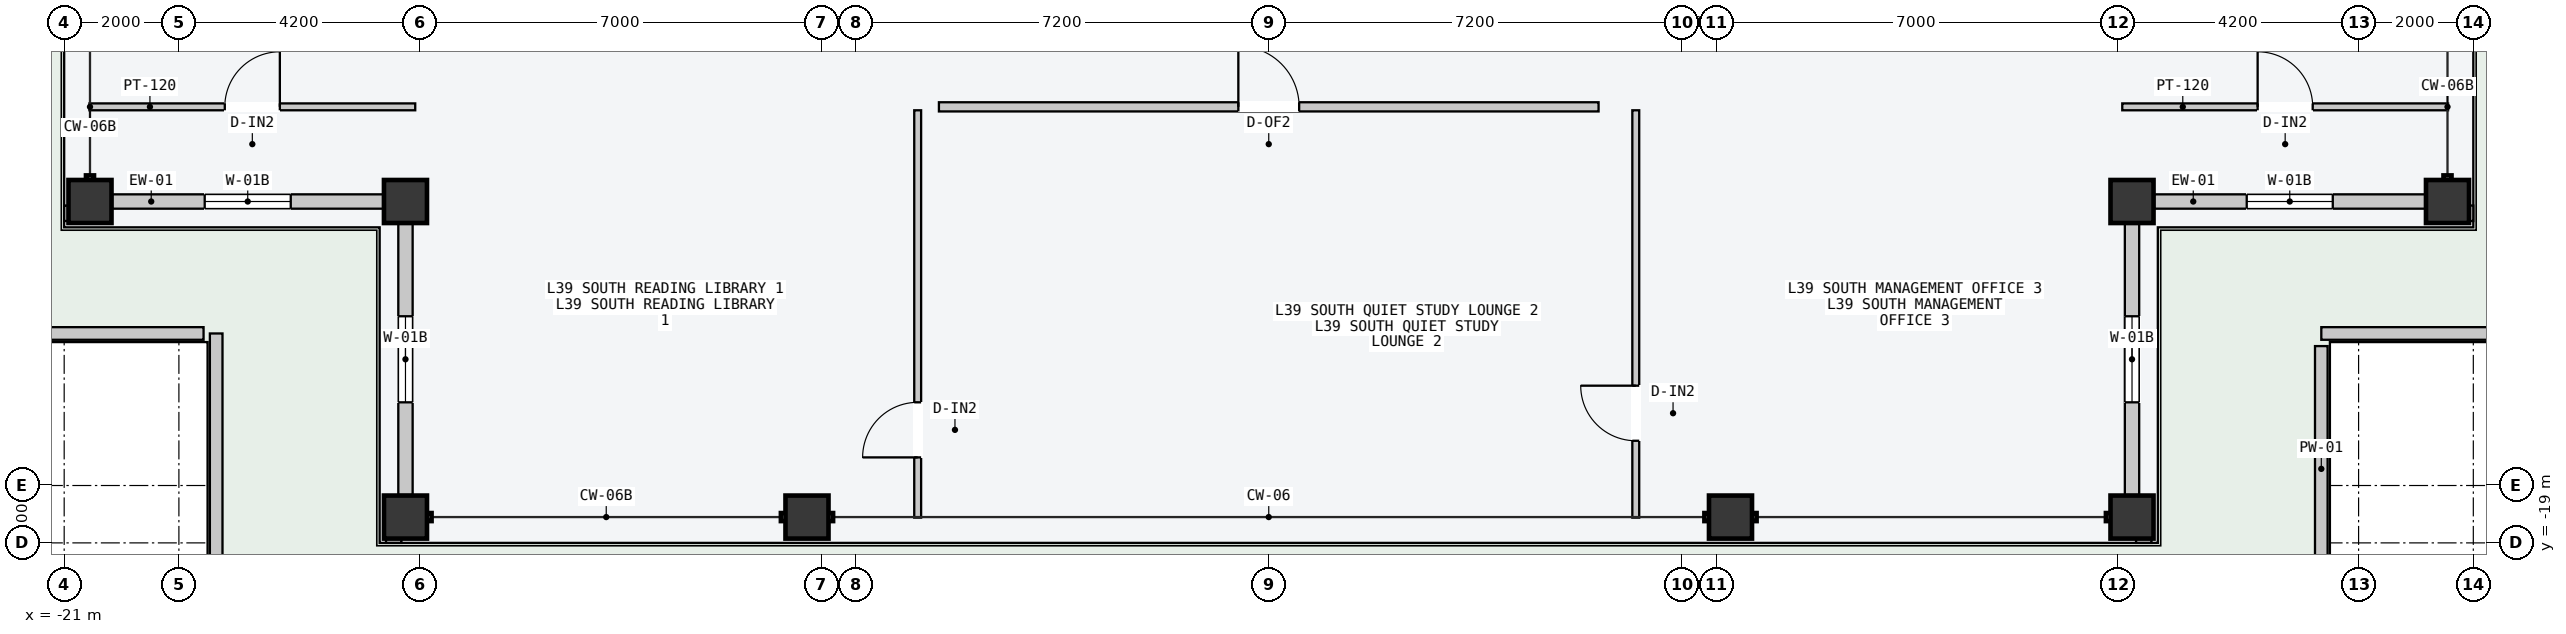
"""IFC4 building model, lengths in metres.
Left out: names, types, materials, properties, quantities, classifications, styles, units other than length and angle.
Written with IfcOpenShell. Run it as: python <this file> out.ifc"""

import sys

from ifc_helpers import new_model, si_unit, direction, frame, frame_2d, origin, origin_2d, place, context, subcontext, project, spatial, rectangle, hollow_rectangle, extrude, element, fill, save


model = new_model("IFC4")
c1 = context("Model", 3, precision=1e-05, world=origin(), true_north=direction((0.0, 1.0)))
c2 = subcontext(c1, "Body", "Model", "MODEL_VIEW")
j1 = project(units=[si_unit("LENGTHUNIT", "METRE"), si_unit("PLANEANGLEUNIT", "RADIAN")], contexts=[c1])
p1 = place(None, origin())
s1 = spatial("IfcSite", under=j1, at=p1, CompositionType="ELEMENT")
p2 = place(p1, origin())
s2 = spatial("IfcBuilding", under=s1, at=p2, CompositionType="ELEMENT")
p3 = place(p2, frame((0.0, 0.0, 150.6)))
s3 = spatial("IfcBuildingStorey", under=s2, at=p3, CompositionType="ELEMENT", Elevation=150.6)
for number, where, z_axis, x_axis in (
    (1, (-15.05, -18.55, -0.2), (0.0, 0.0, 1.0), (1.0, 0.0, 0.0)),
    (2, (-8.05, -18.55, -0.2), (0.0, 0.0, 1.0), (1.0, 0.0, 0.0)),
    (3, (8.05, -18.55, -0.2), (0.0, 0.0, 1.0), (1.0, 0.0, 0.0)),
    (4, (15.05, -18.55, -0.2), (0.0, 0.0, 1.0), (1.0, 0.0, 0.0)),
    (5, (-20.55, -13.05, -0.2), (0.0, 0.0, 1.0), (0.0, 1.0, 0.0)),
    (6, (20.55, -13.05, -0.2), (0.0, 0.0, 1.0), (0.0, 1.0, 0.0)),
    (7, (15.05, -13.05, -0.2), (0.0, 0.0, 1.0), (1.0, 0.0, 0.0)),
    (8, (-15.05, -13.05, -0.2), (0.0, 0.0, 1.0), (1.0, 0.0, 0.0)),
):
    element("IfcColumn", number, at=place(p3, frame(where, z_axis=z_axis, x_axis=x_axis)), inside=s3, PredefinedType="COLUMN", context=c2, shape_type="SweptSolid", body=[
        extrude(hollow_rectangle(XDim=0.75, YDim=0.75, WallThickness=0.032, at=origin_2d()), origin(), (0.0, 0.0, 1.0), 4.7),
    ])
p4 = place(p3, frame((-20.165, -13.05, 0.0), z_axis=(0.0, 0.0, 1.0), x_axis=(1.0, 0.0, 0.0)))
e9 = element("IfcWall", 9, at=p4, inside=s3, PredefinedType="STANDARD", context=c2, shape_type="SweptSolid", body=[
    extrude(rectangle(XDim=4.73, YDim=0.25, at=frame_2d((2.365, 0.0))), origin(), (0.0, 0.0, 1.0), 3.65),
])
p5 = place(p4, frame((1.615, 0.0, 0.85)))
e10 = element("IfcOpeningElement", 10, at=p5, cuts=e9, PredefinedType="OPENING", context=c2, shape_type="SweptSolid", body=[
    extrude(rectangle(XDim=1.5, YDim=1.95, at=frame_2d((0.75, 0.975))), frame((0.0, 0.135, 0.0), z_axis=(0.0, -1.0, 0.0), x_axis=(1.0, 0.0, 0.0)), (0.0, 0.0, 1.0), 0.27),
])
p6 = place(p3, frame((-15.05, -18.165, 0.0), z_axis=(0.0, 0.0, 1.0), x_axis=(0.0, 1.0, 0.0)))
e11 = element("IfcWall", 11, at=p6, inside=s3, PredefinedType="STANDARD", context=c2, shape_type="SweptSolid", body=[
    extrude(rectangle(XDim=4.73, YDim=0.25, at=frame_2d((2.365, 0.0))), origin(), (0.0, 0.0, 1.0), 3.65),
])
p7 = place(p6, frame((1.615, 0.0, 0.85)))
e12 = element("IfcOpeningElement", 12, at=p7, cuts=e11, PredefinedType="OPENING", context=c2, shape_type="SweptSolid", body=[
    extrude(rectangle(XDim=1.5, YDim=1.95, at=frame_2d((0.75, 0.975))), frame((0.0, 0.135, 0.0), z_axis=(0.0, -1.0, 0.0), x_axis=(1.0, 0.0, 0.0)), (0.0, 0.0, 1.0), 0.27),
])
p8 = place(p3, frame((15.435, -13.05, 0.0), z_axis=(0.0, 0.0, 1.0), x_axis=(1.0, 0.0, 0.0)))
e13 = element("IfcWall", 13, at=p8, inside=s3, PredefinedType="STANDARD", context=c2, shape_type="SweptSolid", body=[
    extrude(rectangle(XDim=4.73, YDim=0.25, at=frame_2d((2.365, 0.0))), origin(), (0.0, 0.0, 1.0), 3.65),
])
p9 = place(p8, frame((1.615, 0.0, 0.85)))
e14 = element("IfcOpeningElement", 14, at=p9, cuts=e13, PredefinedType="OPENING", context=c2, shape_type="SweptSolid", body=[
    extrude(rectangle(XDim=1.5, YDim=1.95, at=frame_2d((0.75, 0.975))), frame((0.0, 0.135, 0.0), z_axis=(0.0, -1.0, 0.0), x_axis=(1.0, 0.0, 0.0)), (0.0, 0.0, 1.0), 0.27),
])
p10 = place(p3, frame((15.05, -18.165, 0.0), z_axis=(0.0, 0.0, 1.0), x_axis=(0.0, 1.0, 0.0)))
e15 = element("IfcWall", 15, at=p10, inside=s3, PredefinedType="STANDARD", context=c2, shape_type="SweptSolid", body=[
    extrude(rectangle(XDim=4.73, YDim=0.25, at=frame_2d((2.365, 0.0))), origin(), (0.0, 0.0, 1.0), 3.65),
])
p11 = place(p10, frame((1.615, 0.0, 0.85)))
e16 = element("IfcOpeningElement", 16, at=p11, cuts=e15, PredefinedType="OPENING", context=c2, shape_type="SweptSolid", body=[
    extrude(rectangle(XDim=1.5, YDim=1.95, at=frame_2d((0.75, 0.975))), frame((0.0, 0.135, 0.0), z_axis=(0.0, -1.0, 0.0), x_axis=(1.0, 0.0, 0.0)), (0.0, 0.0, 1.0), 0.27),
])
for number, where, z_axis, x_axis in (
    (17, (-15.39, -18.89, 0.0), (0.0, 0.0, 1.0), (1.0, 0.0, 0.0)),
    (18, (-20.89, -13.39, 0.0), (0.0, 0.0, 1.0), (0.0, 1.0, 0.0)),
    (19, (15.12, -18.89, 0.0), (0.0, 0.0, 1.0), (1.0, 0.0, 0.0)),
    (20, (20.89, -13.39, 0.0), (0.0, 0.0, 1.0), (0.0, 1.0, 0.0)),
):
    element("IfcWall", number, at=place(p3, frame(where, z_axis=z_axis, x_axis=x_axis)), inside=s3, PredefinedType="PARAPET", context=c2, shape_type="SweptSolid", body=[
        extrude(rectangle(XDim=0.27, YDim=0.22, at=frame_2d((0.135, 0.0))), origin(), (0.0, 0.0, 1.0), 1.2),
    ])
p12 = place(p3, frame((18.35, -19.85, 0.0), z_axis=(0.0, 0.0, 1.0), x_axis=(0.0, 1.0, 0.0)))
e21 = element("IfcWall", 21, at=p12, inside=s3, PredefinedType="PARAPET", context=c2, shape_type="SweptSolid", body=[
    extrude(rectangle(XDim=4.28, YDim=0.22, at=frame_2d((2.14, 0.0))), origin(), (0.0, 0.0, 1.0), 1.2),
])
p13 = place(p3, frame((18.35, -15.35, 0.0), z_axis=(0.0, 0.0, 1.0), x_axis=(1.0, 0.0, 0.0)))
e22 = element("IfcWall", 22, at=p13, inside=s3, PredefinedType="PARAPET", context=c2, shape_type="SweptSolid", body=[
    extrude(rectangle(XDim=4.28, YDim=0.22, at=frame_2d((2.14, 0.0))), origin(), (0.0, 0.0, 1.0), 1.2),
])
p14 = place(p3, frame((-22.85, -15.35, 0.0), z_axis=(0.0, 0.0, 1.0), x_axis=(1.0, 0.0, 0.0)))
e23 = element("IfcWall", 23, at=p14, inside=s3, PredefinedType="PARAPET", context=c2, shape_type="SweptSolid", body=[
    extrude(rectangle(XDim=4.28, YDim=0.22, at=frame_2d((2.14, 0.0))), origin(), (0.0, 0.0, 1.0), 1.2),
])
p15 = place(p3, frame((-18.35, -15.35, 0.0), z_axis=(0.0, 0.0, 1.0), x_axis=(0.0, -1.0, 0.0)))
e24 = element("IfcWall", 24, at=p15, inside=s3, PredefinedType="PARAPET", context=c2, shape_type="SweptSolid", body=[
    extrude(rectangle(XDim=4.28, YDim=0.22, at=frame_2d((2.14, 0.0))), origin(), (0.0, 0.0, 1.0), 1.2),
])
p16 = place(p3, frame((-6.12, -18.56, 0.0), z_axis=(0.0, 0.0, 1.0), x_axis=(0.0, 1.0, 0.0)))
e25 = element("IfcWall", 25, at=p16, inside=s3, PredefinedType="PARTITIONING", context=c2, shape_type="SweptSolid", body=[
    extrude(rectangle(XDim=7.1, YDim=0.12, at=frame_2d((3.55, 0.0))), origin(), (0.0, 0.0, 1.0), 4.3),
])
p17 = place(p16, frame((1.05, 0.0, 0.0)))
e26 = element("IfcOpeningElement", 26, at=p17, cuts=e25, PredefinedType="OPENING", context=c2, shape_type="SweptSolid", body=[
    extrude(rectangle(XDim=0.96, YDim=2.18, at=frame_2d((0.48, 1.09))), frame((0.0, 0.07, 0.0), z_axis=(0.0, -1.0, 0.0), x_axis=(1.0, 0.0, 0.0)), (0.0, 0.0, 1.0), 0.14),
])
p18 = place(p3, frame((6.399, -18.56, 0.0), z_axis=(0.0, 0.0, 1.0), x_axis=(0.0, 1.0, 0.0)))
e27 = element("IfcWall", 27, at=p18, inside=s3, PredefinedType="PARTITIONING", context=c2, shape_type="SweptSolid", body=[
    extrude(rectangle(XDim=7.1, YDim=0.12, at=frame_2d((3.55, 0.0))), origin(), (0.0, 0.0, 1.0), 4.3),
])
p19 = place(p18, frame((1.34, 0.0, 0.0)))
e28 = element("IfcOpeningElement", 28, at=p19, cuts=e27, PredefinedType="OPENING", context=c2, shape_type="SweptSolid", body=[
    extrude(rectangle(XDim=0.96, YDim=2.18, at=frame_2d((0.48, 1.09))), frame((0.0, 0.07, 0.0), z_axis=(0.0, -1.0, 0.0), x_axis=(1.0, 0.0, 0.0)), (0.0, 0.0, 1.0), 0.14),
])
p20 = place(p3, frame((-5.75, -11.4, 0.0), z_axis=(0.0, 0.0, 1.0), x_axis=(1.0, 0.0, 0.0)))
e29 = element("IfcWall", 29, at=p20, inside=s3, PredefinedType="PARTITIONING", context=c2, shape_type="SweptSolid", body=[
    extrude(rectangle(XDim=11.5, YDim=0.16, at=frame_2d((5.75, 0.0))), origin(), (0.0, 0.0, 1.0), 4.3),
])
p21 = place(p20, frame((5.22, 0.0, 0.0)))
e30 = element("IfcOpeningElement", 30, at=p21, cuts=e29, PredefinedType="OPENING", context=c2, shape_type="SweptSolid", body=[
    extrude(rectangle(XDim=1.06, YDim=2.2, at=frame_2d((0.53, 1.1))), frame((0.0, 0.09, 0.0), z_axis=(0.0, -1.0, 0.0), x_axis=(1.0, 0.0, 0.0)), (0.0, 0.0, 1.0), 0.18),
])
p22 = place(p3, frame((-20.56, -11.4, 0.0), z_axis=(0.0, 0.0, 1.0), x_axis=(1.0, 0.0, 0.0)))
e31 = element("IfcWall", 31, at=p22, inside=s3, PredefinedType="PARTITIONING", context=c2, shape_type="SweptSolid", body=[
    extrude(rectangle(XDim=5.68, YDim=0.12, at=frame_2d((2.84, 0.0))), origin(), (0.0, 0.0, 1.0), 4.3),
])
p23 = place(p22, frame((2.36, 0.0, 0.0)))
e32 = element("IfcOpeningElement", 32, at=p23, cuts=e31, PredefinedType="OPENING", context=c2, shape_type="SweptSolid", body=[
    extrude(rectangle(XDim=0.96, YDim=2.18, at=frame_2d((0.48, 1.09))), frame((0.0, 0.07, 0.0), z_axis=(0.0, -1.0, 0.0), x_axis=(1.0, 0.0, 0.0)), (0.0, 0.0, 1.0), 0.14),
])
p24 = place(p3, frame((14.88, -11.4, 0.0), z_axis=(0.0, 0.0, 1.0), x_axis=(1.0, 0.0, 0.0)))
e33 = element("IfcWall", 33, at=p24, inside=s3, PredefinedType="PARTITIONING", context=c2, shape_type="SweptSolid", body=[
    extrude(rectangle(XDim=5.68, YDim=0.12, at=frame_2d((2.84, 0.0))), origin(), (0.0, 0.0, 1.0), 4.3),
])
p25 = place(p24, frame((2.36, 0.0, 0.0)))
e34 = element("IfcOpeningElement", 34, at=p25, cuts=e33, PredefinedType="OPENING", context=c2, shape_type="SweptSolid", body=[
    extrude(rectangle(XDim=0.96, YDim=2.18, at=frame_2d((0.48, 1.09))), frame((0.0, 0.07, 0.0), z_axis=(0.0, -1.0, 0.0), x_axis=(1.0, 0.0, 0.0)), (0.0, 0.0, 1.0), 0.14),
])
p26 = place(p5, origin())
e35 = element("IfcWindow", 35, at=p26, inside=s3, PartitioningType="SINGLE_PANEL", PredefinedType="WINDOW", context=c2, shape_type="SweptSolid", body=[
    extrude(rectangle(XDim=1.5, YDim=1.95, at=frame_2d((0.75, 0.975))), frame((0.0, 0.03, 0.0), z_axis=(0.0, -1.0, 0.0), x_axis=(1.0, 0.0, 0.0)), (0.0, 0.0, 1.0), 0.06),
])
fill(e10, e35)
p27 = place(p7, origin())
e36 = element("IfcWindow", 36, at=p27, inside=s3, PartitioningType="SINGLE_PANEL", PredefinedType="WINDOW", context=c2, shape_type="SweptSolid", body=[
    extrude(rectangle(XDim=1.5, YDim=1.95, at=frame_2d((0.75, 0.975))), frame((0.0, 0.03, 0.0), z_axis=(0.0, -1.0, 0.0), x_axis=(1.0, 0.0, 0.0)), (0.0, 0.0, 1.0), 0.06),
])
fill(e12, e36)
p28 = place(p9, origin())
e37 = element("IfcWindow", 37, at=p28, inside=s3, PartitioningType="SINGLE_PANEL", PredefinedType="WINDOW", context=c2, shape_type="SweptSolid", body=[
    extrude(rectangle(XDim=1.5, YDim=1.95, at=frame_2d((0.75, 0.975))), frame((0.0, 0.03, 0.0), z_axis=(0.0, -1.0, 0.0), x_axis=(1.0, 0.0, 0.0)), (0.0, 0.0, 1.0), 0.06),
])
fill(e14, e37)
p29 = place(p11, origin())
e38 = element("IfcWindow", 38, at=p29, inside=s3, PartitioningType="SINGLE_PANEL", PredefinedType="WINDOW", context=c2, shape_type="SweptSolid", body=[
    extrude(rectangle(XDim=1.5, YDim=1.95, at=frame_2d((0.75, 0.975))), frame((0.0, 0.03, 0.0), z_axis=(0.0, -1.0, 0.0), x_axis=(1.0, 0.0, 0.0)), (0.0, 0.0, 1.0), 0.06),
])
fill(e16, e38)
p30 = place(p17, origin())
e39 = element("IfcDoor", 39, at=p30, inside=s3, OperationType="SINGLE_SWING_LEFT", PredefinedType="DOOR", context=c2, shape_type="SweptSolid", body=[
    extrude(rectangle(XDim=0.96, YDim=2.18, at=frame_2d((0.48, 1.09))), frame((0.0, 0.025, 0.0), z_axis=(0.0, -1.0, 0.0), x_axis=(1.0, 0.0, 0.0)), (0.0, 0.0, 1.0), 0.05),
])
fill(e26, e39)
p31 = place(p19, origin())
e40 = element("IfcDoor", 40, at=p31, inside=s3, OperationType="SINGLE_SWING_RIGHT", PredefinedType="DOOR", context=c2, shape_type="SweptSolid", body=[
    extrude(rectangle(XDim=0.96, YDim=2.18, at=frame_2d((0.48, 1.09))), frame((0.0, 0.025, 0.0), z_axis=(0.0, -1.0, 0.0), x_axis=(1.0, 0.0, 0.0)), (0.0, 0.0, 1.0), 0.05),
])
fill(e28, e40)
p32 = place(p21, origin())
e41 = element("IfcDoor", 41, at=p32, inside=s3, OperationType="SINGLE_SWING_LEFT", PredefinedType="DOOR", context=c2, shape_type="SweptSolid", body=[
    extrude(rectangle(XDim=1.06, YDim=2.2, at=frame_2d((0.53, 1.1))), frame((0.0, 0.025, 0.0), z_axis=(0.0, -1.0, 0.0), x_axis=(1.0, 0.0, 0.0)), (0.0, 0.0, 1.0), 0.05),
])
fill(e30, e41)
p33 = place(p23, origin())
e42 = element("IfcDoor", 42, at=p33, inside=s3, OperationType="SINGLE_SWING_RIGHT", PredefinedType="DOOR", context=c2, shape_type="SweptSolid", body=[
    extrude(rectangle(XDim=0.96, YDim=2.18, at=frame_2d((0.48, 1.09))), frame((0.0, 0.025, 0.0), z_axis=(0.0, -1.0, 0.0), x_axis=(1.0, 0.0, 0.0)), (0.0, 0.0, 1.0), 0.05),
])
fill(e32, e42)
p34 = place(p25, origin())
e43 = element("IfcDoor", 43, at=p34, inside=s3, OperationType="SINGLE_SWING_LEFT", PredefinedType="DOOR", context=c2, shape_type="SweptSolid", body=[
    extrude(rectangle(XDim=0.96, YDim=2.18, at=frame_2d((0.48, 1.09))), frame((0.0, 0.025, 0.0), z_axis=(0.0, -1.0, 0.0), x_axis=(1.0, 0.0, 0.0)), (0.0, 0.0, 1.0), 0.05),
])
fill(e34, e43)
save(model, sys.argv[1])
